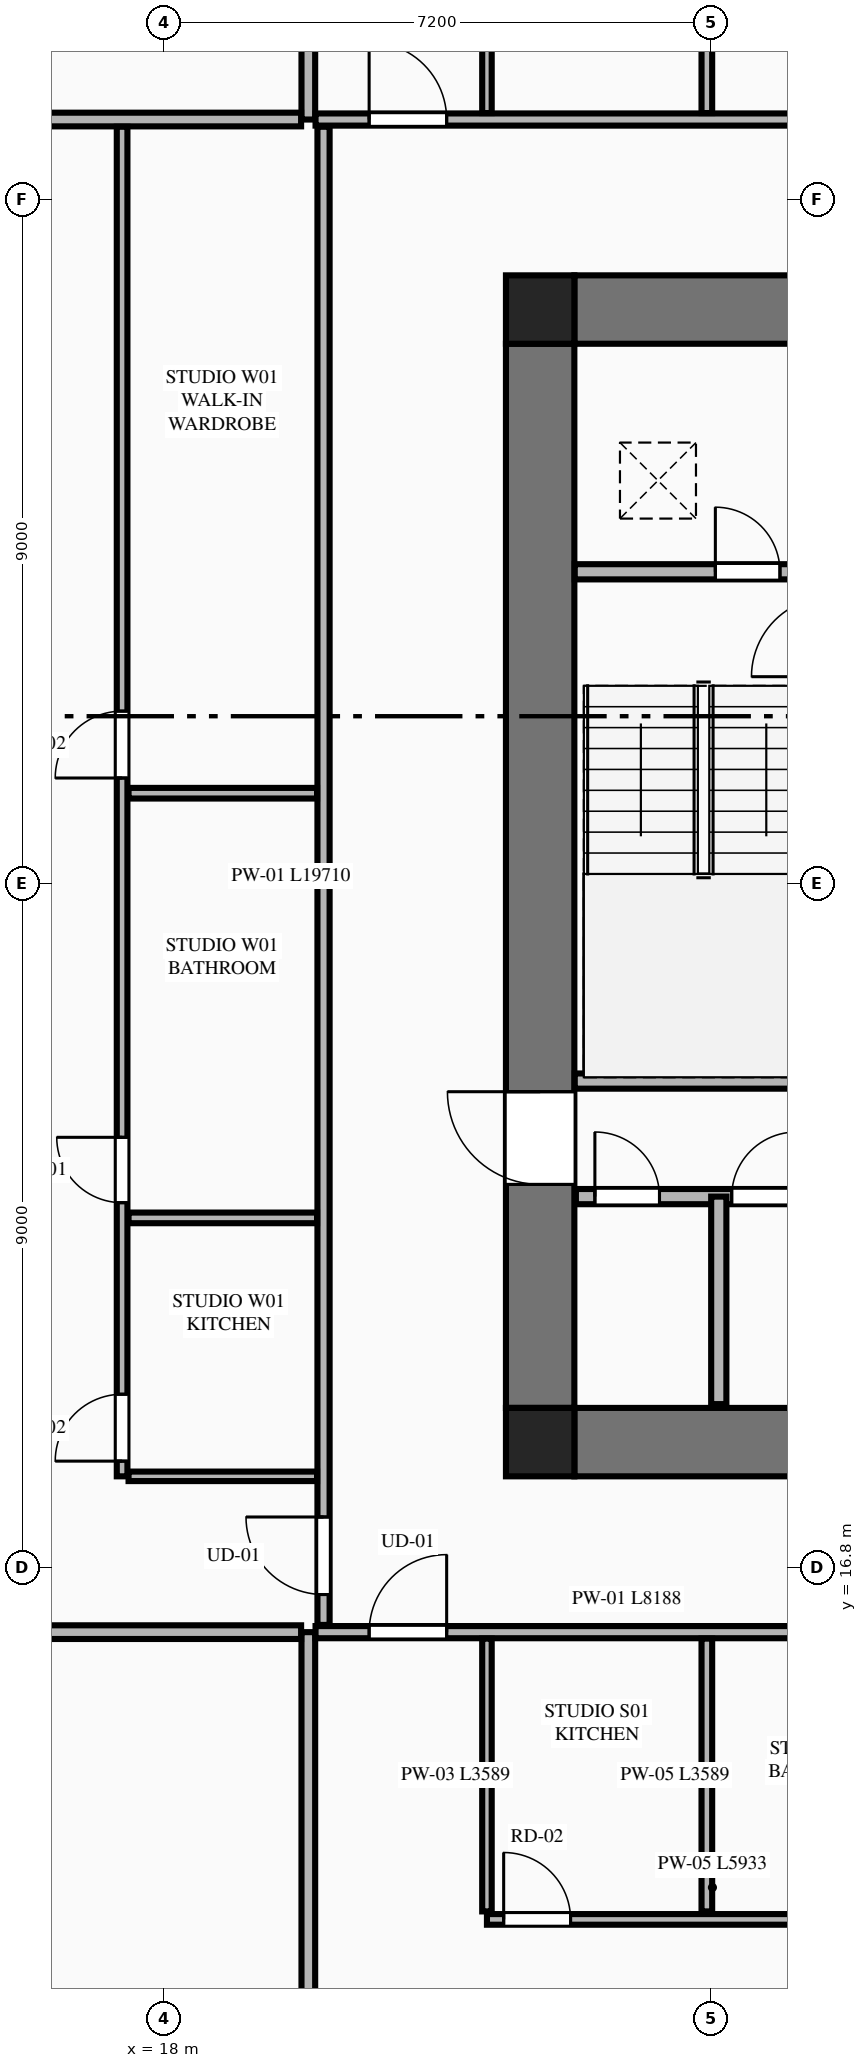
"""IFC4 building model, lengths in metres.
Left out: names, types, materials, properties, quantities, classifications, styles, units other than length and angle.
Written with IfcOpenShell. Run it as: python <this file> out.ifc"""

import sys

from ifc_helpers import new_model, si_unit, direction, frame, frame_2d, origin, origin_2d, place, context, subcontext, project, spatial, rectangle, extrude, element, fill, save


model = new_model("IFC4")
c1 = context("Model", 3, precision=1e-05, world=origin(), true_north=direction((0.0, 1.0)))
c2 = subcontext(c1, "Body", "Model", "MODEL_VIEW")
j1 = project(units=[si_unit("LENGTHUNIT", "METRE"), si_unit("PLANEANGLEUNIT", "RADIAN")], contexts=[c1])
p1 = place(None, origin())
s1 = spatial("IfcSite", under=j1, at=p1, CompositionType="ELEMENT")
p2 = place(p1, origin())
s2 = spatial("IfcBuilding", under=s1, at=p2, CompositionType="ELEMENT")
p3 = place(p2, frame((0.0, 0.0, 63.95)))
s3 = spatial("IfcBuildingStorey", under=s2, at=p3, CompositionType="ELEMENT", Elevation=63.95)
for number, where, z_axis, x_axis in (
    (1, (22.95, 18.45, 0.0), (0.0, 0.0, 1.0), (1.0, 0.0, 0.0)),
    (2, (22.95, 33.35, 0.0), (0.0, 0.0, 1.0), (1.0, 0.0, 0.0)),
):
    element("IfcColumn", number, at=place(p3, frame(where, z_axis=z_axis, x_axis=x_axis)), inside=s3, PredefinedType="COLUMN", context=c2, shape_type="SweptSolid", body=[
        extrude(rectangle(XDim=0.9, YDim=0.9, at=origin_2d()), origin(), (0.0, 0.0, 1.0), 3.55),
    ])
for number, where, z_axis, x_axis in (
    (3, (23.4, 18.45, 0.0), (0.0, 0.0, 1.0), (1.0, 0.0, 0.0)),
    (4, (23.4, 33.35, 0.0), (0.0, 0.0, 1.0), (1.0, 0.0, 0.0)),
):
    element("IfcWall", number, at=place(p3, frame(where, z_axis=z_axis, x_axis=x_axis)), inside=s3, PredefinedType="SHEAR", context=c2, shape_type="SweptSolid", body=[
        extrude(rectangle(XDim=18.0, YDim=0.9, at=frame_2d((9.0, 0.0))), origin(), (0.0, 0.0, 1.0), 3.33),
    ])
p4 = place(p3, frame((22.95, 18.9, 0.0), z_axis=(0.0, 0.0, 1.0), x_axis=(0.0, 1.0, 0.0)))
e5 = element("IfcWall", 5, at=p4, inside=s3, PredefinedType="SHEAR", context=c2, shape_type="SweptSolid", body=[
    extrude(rectangle(XDim=14.0, YDim=0.9, at=frame_2d((7.0, 0.0))), origin(), (0.0, 0.0, 1.0), 3.33),
])
p5 = place(p4, frame((2.94, 0.0, 0.0)))
e6 = element("IfcOpeningElement", 6, at=p5, cuts=e5, PredefinedType="OPENING", context=c2, shape_type="SweptSolid", body=[
    extrude(rectangle(XDim=1.22, YDim=2.25, at=frame_2d((0.61, 1.125))), frame((0.0, 0.46, 0.0), z_axis=(0.0, -1.0, 0.0), x_axis=(1.0, 0.0, 0.0)), (0.0, 0.0, 1.0), 0.92),
])
p6 = place(p3, frame((23.405, 23.2, 0.0), z_axis=(0.0, 0.0, 1.0), x_axis=(1.0, 0.0, 0.0)))
e7 = element("IfcWall", 7, at=p6, inside=s3, PredefinedType="PLUMBINGWALL", context=c2, shape_type="SweptSolid", body=[
    extrude(rectangle(XDim=3.27, YDim=0.2, at=frame_2d((1.635, 0.0))), origin(), (0.0, 0.0, 1.0), 3.33),
])
p7 = place(p3, frame((23.405, 29.9, 0.0), z_axis=(0.0, 0.0, 1.0), x_axis=(1.0, 0.0, 0.0)))
e8 = element("IfcWall", 8, at=p7, inside=s3, PredefinedType="PLUMBINGWALL", context=c2, shape_type="SweptSolid", body=[
    extrude(rectangle(XDim=3.27, YDim=0.2, at=frame_2d((1.635, 0.0))), origin(), (0.0, 0.0, 1.0), 3.33),
])
p8 = place(p7, frame((1.85, 0.0, 0.0)))
e9 = element("IfcOpeningElement", 9, at=p8, cuts=e8, PredefinedType="OPENING", context=c2, shape_type="SweptSolid", body=[
    extrude(rectangle(XDim=0.85, YDim=2.05, at=frame_2d((0.425, 1.025))), frame((0.0, 0.11, 0.0), z_axis=(0.0, -1.0, 0.0), x_axis=(1.0, 0.0, 0.0)), (0.0, 0.0, 1.0), 0.22),
])
p9 = place(p3, frame((23.42, 21.68, 0.0), z_axis=(0.0, 0.0, 1.0), x_axis=(1.0, 0.0, 0.0)))
e10 = element("IfcWall", 10, at=p9, inside=s3, PredefinedType="PLUMBINGWALL", context=c2, shape_type="SweptSolid", body=[
    extrude(rectangle(XDim=17.96, YDim=0.2, at=frame_2d((8.98, 0.0))), origin(), (0.0, 0.0, 1.0), 3.33),
])
p10 = place(p9, frame((4.45, 0.0, 0.0)))
e11 = element("IfcOpeningElement", 11, at=p10, cuts=e10, PredefinedType="OPENING", context=c2, shape_type="SweptSolid", body=[
    extrude(rectangle(XDim=1.1, YDim=2.2, at=frame_2d((0.55, 1.1))), frame((0.0, 0.11, 0.0), z_axis=(0.0, -1.0, 0.0), x_axis=(1.0, 0.0, 0.0)), (0.0, 0.0, 1.0), 0.22),
])
p11 = place(p9, frame((6.85, 0.0, 0.0)))
e12 = element("IfcOpeningElement", 12, at=p11, cuts=e10, PredefinedType="OPENING", context=c2, shape_type="SweptSolid", body=[
    extrude(rectangle(XDim=1.1, YDim=2.2, at=frame_2d((0.55, 1.1))), frame((0.0, 0.11, 0.0), z_axis=(0.0, -1.0, 0.0), x_axis=(1.0, 0.0, 0.0)), (0.0, 0.0, 1.0), 0.22),
])
p12 = place(p9, frame((9.25, 0.0, 0.0)))
e13 = element("IfcOpeningElement", 13, at=p12, cuts=e10, PredefinedType="OPENING", context=c2, shape_type="SweptSolid", body=[
    extrude(rectangle(XDim=1.1, YDim=2.2, at=frame_2d((0.55, 1.1))), frame((0.0, 0.11, 0.0), z_axis=(0.0, -1.0, 0.0), x_axis=(1.0, 0.0, 0.0)), (0.0, 0.0, 1.0), 0.22),
])
p13 = place(p9, frame((0.25, 0.0, 0.0)))
e14 = element("IfcOpeningElement", 14, at=p13, cuts=e10, PredefinedType="OPENING", context=c2, shape_type="SweptSolid", body=[
    extrude(rectangle(XDim=0.85, YDim=2.05, at=frame_2d((0.425, 1.025))), frame((0.0, 0.11, 0.0), z_axis=(0.0, -1.0, 0.0), x_axis=(1.0, 0.0, 0.0)), (0.0, 0.0, 1.0), 0.22),
])
p14 = place(p9, frame((2.05, 0.0, 0.0)))
e15 = element("IfcOpeningElement", 15, at=p14, cuts=e10, PredefinedType="OPENING", context=c2, shape_type="SweptSolid", body=[
    extrude(rectangle(XDim=0.85, YDim=2.05, at=frame_2d((0.425, 1.025))), frame((0.0, 0.11, 0.0), z_axis=(0.0, -1.0, 0.0), x_axis=(1.0, 0.0, 0.0)), (0.0, 0.0, 1.0), 0.22),
])
p15 = place(p9, frame((14.6, 0.0, 0.0)))
e16 = element("IfcOpeningElement", 16, at=p15, cuts=e10, PredefinedType="OPENING", context=c2, shape_type="SweptSolid", body=[
    extrude(rectangle(XDim=0.85, YDim=2.05, at=frame_2d((0.425, 1.025))), frame((0.0, 0.11, 0.0), z_axis=(0.0, -1.0, 0.0), x_axis=(1.0, 0.0, 0.0)), (0.0, 0.0, 1.0), 0.22),
])
p16 = place(p3, frame((25.3, 18.95, 0.0), z_axis=(0.0, 0.0, 1.0), x_axis=(0.0, 1.0, 0.0)))
e17 = element("IfcWall", 17, at=p16, inside=s3, PredefinedType="PLUMBINGWALL", context=c2, shape_type="SweptSolid", body=[
    extrude(rectangle(XDim=2.73, YDim=0.2, at=frame_2d((1.365, 0.0))), origin(), (0.0, 0.0, 1.0), 3.33),
])
p17 = place(p3, frame((19.9, 2.455, 0.0), z_axis=(0.0, 0.0, 1.0), x_axis=(0.0, 1.0, 0.0)))
e18 = element("IfcWall", 18, at=p17, inside=s3, PredefinedType="PARTITIONING", context=c2, shape_type="SweptSolid", body=[
    extrude(rectangle(XDim=13.495, YDim=0.18, at=frame_2d((6.748, 0.0))), origin(), (0.0, 0.0, 1.0), 3.33),
])
p18 = place(p3, frame((19.995, 15.95, 0.0), z_axis=(0.0, 0.0, 1.0), x_axis=(1.0, 0.0, 0.0)))
e19 = element("IfcWall", 19, at=p18, inside=s3, PredefinedType="PARTITIONING", context=c2, shape_type="SweptSolid", body=[
    extrude(rectangle(XDim=8.188, YDim=0.16, at=frame_2d((4.094, 0.0))), origin(), (0.0, 0.0, 1.0), 3.33),
])
p19 = place(p18, frame((0.705, 0.0, 0.0)))
e20 = element("IfcOpeningElement", 20, at=p19, cuts=e19, PredefinedType="OPENING", context=c2, shape_type="SweptSolid", body=[
    extrude(rectangle(XDim=1.02, YDim=2.25, at=frame_2d((0.51, 1.125))), frame((0.0, 0.09, 0.0), z_axis=(0.0, -1.0, 0.0), x_axis=(1.0, 0.0, 0.0)), (0.0, 0.0, 1.0), 0.18),
])
p20 = place(p3, frame((22.25, 12.276, 0.0), z_axis=(0.0, 0.0, 1.0), x_axis=(0.0, 1.0, 0.0)))
e21 = element("IfcWall", 21, at=p20, inside=s3, PredefinedType="PARTITIONING", context=c2, shape_type="SweptSolid", body=[
    extrude(rectangle(XDim=3.589, YDim=0.125, at=frame_2d((1.794, 0.0))), origin(), (0.0, 0.0, 1.0), 2.7),
])
p21 = place(p3, frame((22.25, 12.171, 0.0), z_axis=(0.0, 0.0, 1.0), x_axis=(1.0, 0.0, 0.0)))
e22 = element("IfcWall", 22, at=p21, inside=s3, PredefinedType="PLUMBINGWALL", context=c2, shape_type="SweptSolid", body=[
    extrude(rectangle(XDim=5.933, YDim=0.14, at=frame_2d((2.967, 0.0))), origin(), (0.0, 0.0, 1.0), 3.33),
])
p22 = place(p21, frame((3.988, 0.0, 0.0)))
e23 = element("IfcOpeningElement", 23, at=p22, cuts=e22, PredefinedType="OPENING", context=c2, shape_type="SweptSolid", body=[
    extrude(rectangle(XDim=0.86, YDim=2.1, at=frame_2d((0.43, 1.05))), frame((0.0, 0.08, 0.0), z_axis=(0.0, -1.0, 0.0), x_axis=(1.0, 0.0, 0.0)), (0.0, 0.0, 1.0), 0.16),
])
p23 = place(p21, frame((0.22, 0.0, 0.0)))
e24 = element("IfcOpeningElement", 24, at=p23, cuts=e22, PredefinedType="OPENING", context=c2, shape_type="SweptSolid", body=[
    extrude(rectangle(XDim=0.88, YDim=2.15, at=frame_2d((0.44, 1.075))), frame((0.0, 0.08, 0.0), z_axis=(0.0, -1.0, 0.0), x_axis=(1.0, 0.0, 0.0)), (0.0, 0.0, 1.0), 0.16),
])
p24 = place(p3, frame((25.143, 12.276, 0.0), z_axis=(0.0, 0.0, 1.0), x_axis=(0.0, 1.0, 0.0)))
e25 = element("IfcWall", 25, at=p24, inside=s3, PredefinedType="PLUMBINGWALL", context=c2, shape_type="SweptSolid", body=[
    extrude(rectangle(XDim=3.589, YDim=0.14, at=frame_2d((1.794, 0.0))), origin(), (0.0, 0.0, 1.0), 3.33),
])
p25 = place(p3, frame((19.9, 35.85, 0.0), z_axis=(0.0, 0.0, 1.0), x_axis=(0.0, 1.0, 0.0)))
e26 = element("IfcWall", 26, at=p25, inside=s3, PredefinedType="PARTITIONING", context=c2, shape_type="SweptSolid", body=[
    extrude(rectangle(XDim=13.295, YDim=0.18, at=frame_2d((6.647, 0.0))), origin(), (0.0, 0.0, 1.0), 3.33),
])
p26 = place(p3, frame((19.995, 35.85, 0.0), z_axis=(0.0, 0.0, 1.0), x_axis=(1.0, 0.0, 0.0)))
e27 = element("IfcWall", 27, at=p26, inside=s3, PredefinedType="PARTITIONING", context=c2, shape_type="SweptSolid", body=[
    extrude(rectangle(XDim=8.188, YDim=0.16, at=frame_2d((4.094, 0.0))), origin(), (0.0, 0.0, 1.0), 3.33),
])
p27 = place(p26, frame((0.705, 0.0, 0.0)))
e28 = element("IfcOpeningElement", 28, at=p27, cuts=e27, PredefinedType="OPENING", context=c2, shape_type="SweptSolid", body=[
    extrude(rectangle(XDim=1.02, YDim=2.25, at=frame_2d((0.51, 1.125))), frame((0.0, 0.09, 0.0), z_axis=(0.0, -1.0, 0.0), x_axis=(1.0, 0.0, 0.0)), (0.0, 0.0, 1.0), 0.18),
])
p28 = place(p3, frame((22.25, 35.935, 0.0), z_axis=(0.0, 0.0, 1.0), x_axis=(0.0, 1.0, 0.0)))
e29 = element("IfcWall", 29, at=p28, inside=s3, PredefinedType="PARTITIONING", context=c2, shape_type="SweptSolid", body=[
    extrude(rectangle(XDim=6.989, YDim=0.125, at=frame_2d((3.495, 0.0))), origin(), (0.0, 0.0, 1.0), 2.7),
])
p29 = place(p3, frame((25.143, 35.935, 0.0), z_axis=(0.0, 0.0, 1.0), x_axis=(0.0, 1.0, 0.0)))
e30 = element("IfcWall", 30, at=p29, inside=s3, PredefinedType="PLUMBINGWALL", context=c2, shape_type="SweptSolid", body=[
    extrude(rectangle(XDim=6.989, YDim=0.14, at=frame_2d((3.495, 0.0))), origin(), (0.0, 0.0, 1.0), 3.33),
])
p30 = place(p3, frame((10.564, 15.95, 0.0), z_axis=(0.0, 0.0, 1.0), x_axis=(1.0, 0.0, 0.0)))
e31 = element("IfcWall", 31, at=p30, inside=s3, PredefinedType="PARTITIONING", context=c2, shape_type="SweptSolid", body=[
    extrude(rectangle(XDim=9.241, YDim=0.18, at=frame_2d((4.621, 0.0))), origin(), (0.0, 0.0, 1.0), 3.33),
])
p31 = place(p3, frame((10.665, 35.85, 0.0), z_axis=(0.0, 0.0, 1.0), x_axis=(1.0, 0.0, 0.0)))
e32 = element("IfcWall", 32, at=p31, inside=s3, PredefinedType="PARTITIONING", context=c2, shape_type="SweptSolid", body=[
    extrude(rectangle(XDim=9.14, YDim=0.18, at=frame_2d((4.57, 0.0))), origin(), (0.0, 0.0, 1.0), 3.33),
])
p32 = place(p3, frame((20.1, 16.045, 0.0), z_axis=(0.0, 0.0, 1.0), x_axis=(0.0, 1.0, 0.0)))
e33 = element("IfcWall", 33, at=p32, inside=s3, PredefinedType="PARTITIONING", context=c2, shape_type="SweptSolid", body=[
    extrude(rectangle(XDim=19.71, YDim=0.16, at=frame_2d((9.855, 0.0))), origin(), (0.0, 0.0, 1.0), 2.7),
])
p33 = place(p32, frame((0.4, 0.0, 0.0)))
e34 = element("IfcOpeningElement", 34, at=p33, cuts=e33, PredefinedType="OPENING", context=c2, shape_type="SweptSolid", body=[
    extrude(rectangle(XDim=1.02, YDim=2.25, at=frame_2d((0.51, 1.125))), frame((0.0, 0.09, 0.0), z_axis=(0.0, -1.0, 0.0), x_axis=(1.0, 0.0, 0.0)), (0.0, 0.0, 1.0), 0.18),
])
p34 = place(p3, frame((17.535, 18.0, 0.0), z_axis=(0.0, 0.0, 1.0), x_axis=(1.0, 0.0, 0.0)))
e35 = element("IfcWall", 35, at=p34, inside=s3, PredefinedType="PARTITIONING", context=c2, shape_type="SweptSolid", body=[
    extrude(rectangle(XDim=2.48, YDim=0.125, at=frame_2d((1.24, 0.0))), origin(), (0.0, 0.0, 1.0), 2.7),
])
p35 = place(p3, frame((17.45, 18.0, 0.0), z_axis=(0.0, 0.0, 1.0), x_axis=(0.0, 1.0, 0.0)))
e36 = element("IfcWall", 36, at=p35, inside=s3, PredefinedType="PLUMBINGWALL", context=c2, shape_type="SweptSolid", body=[
    extrude(rectangle(XDim=17.755, YDim=0.14, at=frame_2d((8.877, 0.0))), origin(), (0.0, 0.0, 1.0), 3.33),
])
p36 = place(p35, frame((3.6, 0.0, 0.0)))
e37 = element("IfcOpeningElement", 37, at=p36, cuts=e36, PredefinedType="OPENING", context=c2, shape_type="SweptSolid", body=[
    extrude(rectangle(XDim=0.86, YDim=2.1, at=frame_2d((0.43, 1.05))), frame((0.0, 0.08, 0.0), z_axis=(0.0, -1.0, 0.0), x_axis=(1.0, 0.0, 0.0)), (0.0, 0.0, 1.0), 0.16),
])
p37 = place(p35, frame((9.187, 0.0, 0.0)))
e38 = element("IfcOpeningElement", 38, at=p37, cuts=e36, PredefinedType="OPENING", context=c2, shape_type="SweptSolid", body=[
    extrude(rectangle(XDim=0.88, YDim=2.15, at=frame_2d((0.44, 1.075))), frame((0.0, 0.08, 0.0), z_axis=(0.0, -1.0, 0.0), x_axis=(1.0, 0.0, 0.0)), (0.0, 0.0, 1.0), 0.16),
])
p38 = place(p35, frame((0.2, 0.0, 0.0)))
e39 = element("IfcOpeningElement", 39, at=p38, cuts=e36, PredefinedType="OPENING", context=c2, shape_type="SweptSolid", body=[
    extrude(rectangle(XDim=0.88, YDim=2.15, at=frame_2d((0.44, 1.075))), frame((0.0, 0.08, 0.0), z_axis=(0.0, -1.0, 0.0), x_axis=(1.0, 0.0, 0.0)), (0.0, 0.0, 1.0), 0.16),
])
for number, where, z_axis, x_axis in (
    (40, (17.535, 21.4, 0.0), (0.0, 0.0, 1.0), (1.0, 0.0, 0.0)),
    (41, (17.535, 26.987, 0.0), (0.0, 0.0, 1.0), (1.0, 0.0, 0.0)),
):
    element("IfcWall", number, at=place(p3, frame(where, z_axis=z_axis, x_axis=x_axis)), inside=s3, PredefinedType="PLUMBINGWALL", context=c2, shape_type="SweptSolid", body=[
        extrude(rectangle(XDim=2.48, YDim=0.14, at=frame_2d((1.24, 0.0))), origin(), (0.0, 0.0, 1.0), 3.33),
    ])
p39 = place(p5, origin())
e42 = element("IfcDoor", 42, at=p39, inside=s3, OperationType="SINGLE_SWING_RIGHT", PredefinedType="DOOR", context=c2, shape_type="SweptSolid", body=[
    extrude(rectangle(XDim=1.22, YDim=2.25, at=frame_2d((0.61, 1.125))), frame((0.0, 0.025, 0.0), z_axis=(0.0, -1.0, 0.0), x_axis=(1.0, 0.0, 0.0)), (0.0, 0.0, 1.0), 0.05),
])
fill(e6, e42)
p40 = place(p8, origin())
e43 = element("IfcDoor", 43, at=p40, inside=s3, OperationType="SINGLE_SWING_LEFT", PredefinedType="DOOR", context=c2, shape_type="SweptSolid", body=[
    extrude(rectangle(XDim=0.85, YDim=2.05, at=frame_2d((0.425, 1.025))), frame((0.0, 0.025, 0.0), z_axis=(0.0, -1.0, 0.0), x_axis=(1.0, 0.0, 0.0)), (0.0, 0.0, 1.0), 0.05),
])
fill(e9, e43)
p41 = place(p13, origin())
e44 = element("IfcDoor", 44, at=p41, inside=s3, OperationType="SINGLE_SWING_LEFT", PredefinedType="DOOR", context=c2, shape_type="SweptSolid", body=[
    extrude(rectangle(XDim=0.85, YDim=2.05, at=frame_2d((0.425, 1.025))), frame((0.0, 0.025, 0.0), z_axis=(0.0, -1.0, 0.0), x_axis=(1.0, 0.0, 0.0)), (0.0, 0.0, 1.0), 0.05),
])
fill(e14, e44)
p42 = place(p14, origin())
e45 = element("IfcDoor", 45, at=p42, inside=s3, OperationType="SINGLE_SWING_RIGHT", PredefinedType="DOOR", context=c2, shape_type="SweptSolid", body=[
    extrude(rectangle(XDim=0.85, YDim=2.05, at=frame_2d((0.425, 1.025))), frame((0.0, 0.025, 0.0), z_axis=(0.0, -1.0, 0.0), x_axis=(1.0, 0.0, 0.0)), (0.0, 0.0, 1.0), 0.05),
])
fill(e15, e45)
p43 = place(p19, origin())
e46 = element("IfcDoor", 46, at=p43, inside=s3, OperationType="SINGLE_SWING_RIGHT", PredefinedType="DOOR", context=c2, shape_type="SweptSolid", body=[
    extrude(rectangle(XDim=1.02, YDim=2.25, at=frame_2d((0.51, 1.125))), frame((0.0, 0.025, 0.0), z_axis=(0.0, -1.0, 0.0), x_axis=(1.0, 0.0, 0.0)), (0.0, 0.0, 1.0), 0.05),
])
fill(e20, e46)
p44 = place(p23, origin())
e47 = element("IfcDoor", 47, at=p44, inside=s3, OperationType="SINGLE_SWING_LEFT", PredefinedType="DOOR", context=c2, shape_type="SweptSolid", body=[
    extrude(rectangle(XDim=0.88, YDim=2.15, at=frame_2d((0.44, 1.075))), frame((0.0, 0.025, 0.0), z_axis=(0.0, -1.0, 0.0), x_axis=(1.0, 0.0, 0.0)), (0.0, 0.0, 1.0), 0.05),
])
fill(e24, e47)
p45 = place(p27, origin())
e48 = element("IfcDoor", 48, at=p45, inside=s3, OperationType="SINGLE_SWING_LEFT", PredefinedType="DOOR", context=c2, shape_type="SweptSolid", body=[
    extrude(rectangle(XDim=1.02, YDim=2.25, at=frame_2d((0.51, 1.125))), frame((0.0, 0.025, 0.0), z_axis=(0.0, -1.0, 0.0), x_axis=(1.0, 0.0, 0.0)), (0.0, 0.0, 1.0), 0.05),
])
fill(e28, e48)
p46 = place(p36, origin())
e49 = element("IfcDoor", 49, at=p46, inside=s3, OperationType="SINGLE_SWING_RIGHT", PredefinedType="DOOR", context=c2, shape_type="SweptSolid", body=[
    extrude(rectangle(XDim=0.86, YDim=2.1, at=frame_2d((0.43, 1.05))), frame((0.0, 0.025, 0.0), z_axis=(0.0, -1.0, 0.0), x_axis=(1.0, 0.0, 0.0)), (0.0, 0.0, 1.0), 0.05),
])
fill(e37, e49)
p47 = place(p37, origin())
e50 = element("IfcDoor", 50, at=p47, inside=s3, OperationType="SINGLE_SWING_LEFT", PredefinedType="DOOR", context=c2, shape_type="SweptSolid", body=[
    extrude(rectangle(XDim=0.88, YDim=2.15, at=frame_2d((0.44, 1.075))), frame((0.0, 0.025, 0.0), z_axis=(0.0, -1.0, 0.0), x_axis=(1.0, 0.0, 0.0)), (0.0, 0.0, 1.0), 0.05),
])
fill(e38, e50)
p48 = place(p33, origin())
e51 = element("IfcDoor", 51, at=p48, inside=s3, OperationType="SINGLE_SWING_RIGHT", PredefinedType="DOOR", context=c2, shape_type="SweptSolid", body=[
    extrude(rectangle(XDim=1.02, YDim=2.25, at=frame_2d((0.51, 1.125))), frame((0.0, 0.025, 0.0), z_axis=(0.0, -1.0, 0.0), x_axis=(1.0, 0.0, 0.0)), (0.0, 0.0, 1.0), 0.05),
])
fill(e34, e51)
p49 = place(p38, origin())
e52 = element("IfcDoor", 52, at=p49, inside=s3, OperationType="SINGLE_SWING_LEFT", PredefinedType="DOOR", context=c2, shape_type="SweptSolid", body=[
    extrude(rectangle(XDim=0.88, YDim=2.15, at=frame_2d((0.44, 1.075))), frame((0.0, 0.025, 0.0), z_axis=(0.0, -1.0, 0.0), x_axis=(1.0, 0.0, 0.0)), (0.0, 0.0, 1.0), 0.05),
])
fill(e39, e52)
save(model, sys.argv[1])
